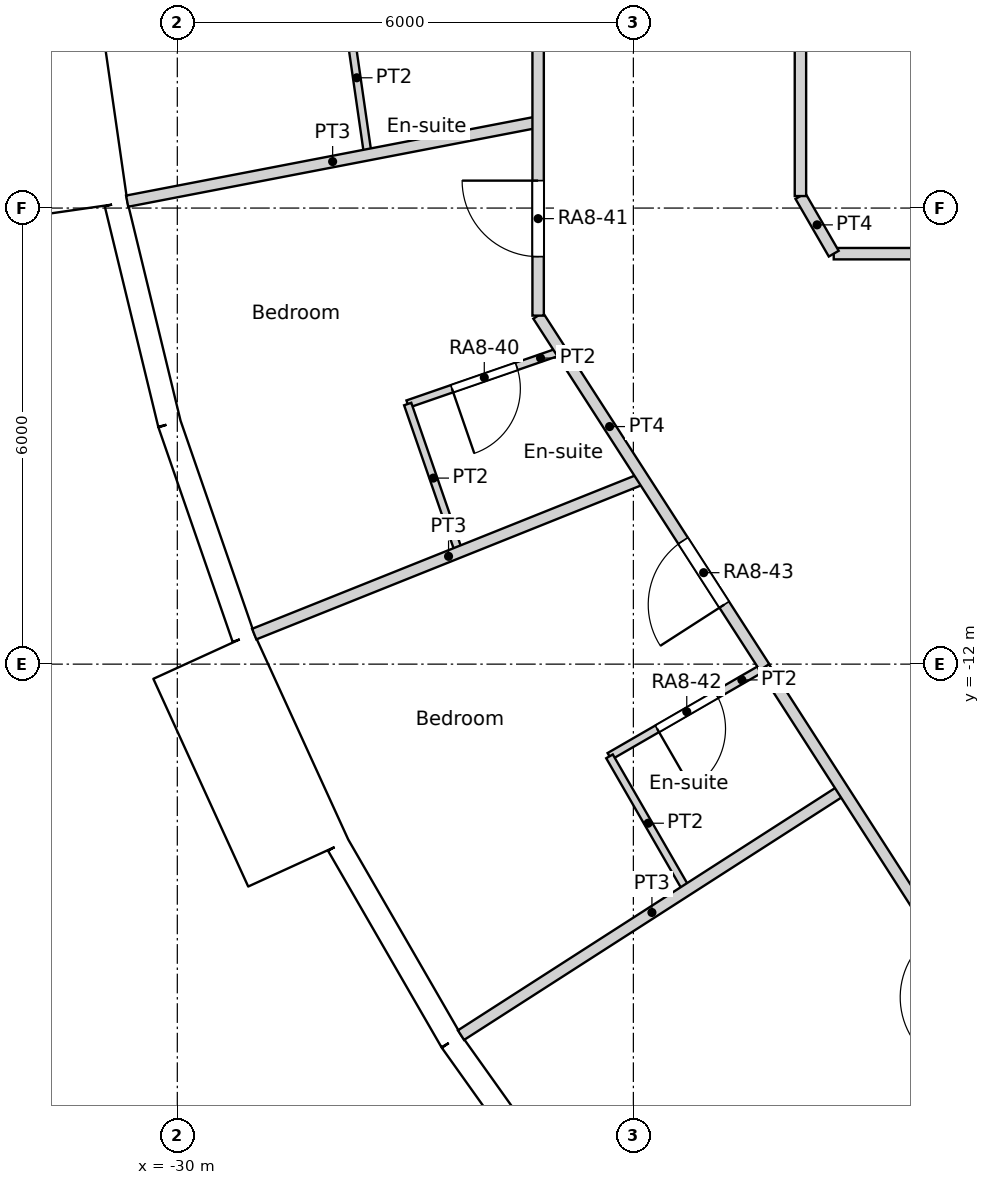
"""IFC4 building model, lengths in metres.
Left out: names, types, materials, properties, quantities, classifications, styles, units other than length and angle.
Written with IfcOpenShell. Run it as: python <this file> out.ifc"""

import sys

from ifc_helpers import new_model, si_unit, direction, frame, frame_2d, origin, origin_2d, place, context, subcontext, project, spatial, rectangle, circle, extrude, element, fill, save


model = new_model("IFC4")
c1 = context("Model", 3, precision=1e-05, world=origin(), true_north=direction((0.0, 1.0)))
c2 = subcontext(c1, "Body", "Model", "MODEL_VIEW")
j1 = project(units=[si_unit("LENGTHUNIT", "METRE"), si_unit("PLANEANGLEUNIT", "RADIAN")], contexts=[c1])
p1 = place(None, origin())
s1 = spatial("IfcSite", under=j1, at=p1, CompositionType="ELEMENT")
p2 = place(p1, origin())
s2 = spatial("IfcBuilding", under=s1, at=p2, CompositionType="ELEMENT")
p3 = place(p2, frame((0.0, 0.0, 103.8)))
s3 = spatial("IfcBuildingStorey", under=s2, at=p3, CompositionType="ELEMENT", Elevation=103.8)
for number, where, z_axis, x_axis in (
    (1, (-29.048, -8.529, 0.0), (0.0, 0.0, 1.0), (1.0, 0.0, 0.0)),
    (2, (-26.909, -13.873, 0.0), (0.0, 0.0, 1.0), (1.0, 0.0, 0.0)),
):
    element("IfcColumn", number, at=place(p3, frame(where, z_axis=z_axis, x_axis=x_axis)), inside=s3, PredefinedType="COLUMN", context=c2, shape_type="SweptSolid", body=[
        extrude(circle(Radius=0.6, at=origin_2d()), origin(), (0.0, 0.0, 1.0), 3.6),
    ])
for number, where, z_axis, x_axis in (
    (3, (-23.067, -8.396, 0.0), (0.0, 0.0, 1.0), (1.0, 0.0, 0.0)),
    (4, (-20.509, -13.489, 0.0), (0.0, 0.0, 1.0), (1.0, 0.0, 0.0)),
):
    element("IfcColumn", number, at=place(p3, frame(where, z_axis=z_axis, x_axis=x_axis)), inside=s3, PredefinedType="COLUMN", context=c2, shape_type="SweptSolid", body=[
        extrude(circle(Radius=0.65, at=origin_2d()), origin(), (0.0, 0.0, 1.0), 3.6),
    ])
p4 = place(p3, frame((-31.802, -3.057, -0.45), z_axis=(0.0, 0.0, 1.0), x_axis=(0.142332746704, -0.989818866872, 0.0)))
e5 = element("IfcWall", 5, at=p4, inside=s3, PredefinedType="ELEMENTEDWALL", context=c2, shape_type="SweptSolid", body=[
    extrude(rectangle(XDim=3.0, YDim=1.45, at=frame_2d((1.5, 0.0))), origin(), (0.0, 0.0, 1.0), 3.6),
])
p5 = place(p4, frame((1.5, 0.0, 2.0)))
e6 = element("IfcOpeningElement", 6, at=p5, cuts=e5, PredefinedType="OPENING", context=c2, shape_type="SweptSolid", body=[
    extrude(circle(Radius=0.9, at=origin_2d()), frame((0.0, 0.735, 0.0), z_axis=(0.0, -1.0, 0.0), x_axis=(1.0, 0.0, 0.0)), (0.0, 0.0, 1.0), 1.47),
])
p6 = place(p3, frame((-30.806, -5.944, 0.0), z_axis=(0.0, 0.0, 1.0), x_axis=(0.235743081534, -0.971815414319, 0.0)))
e7 = element("IfcWall", 7, at=p6, inside=s3, PredefinedType="SOLIDWALL", context=c2, shape_type="SweptSolid", body=[
    extrude(rectangle(XDim=2.979, YDim=0.3, at=frame_2d((1.49, 0.0))), origin(), (0.0, 0.0, 1.0), 3.15),
])
p7 = place(p6, frame((1.49, 0.0, 1.55)))
e8 = element("IfcOpeningElement", 8, at=p7, cuts=e7, PredefinedType="OPENING", context=c2, shape_type="SweptSolid", body=[
    extrude(circle(Radius=0.9, at=origin_2d()), frame((0.0, 0.16, 0.0), z_axis=(0.0, -1.0, 0.0), x_axis=(1.0, 0.0, 0.0)), (0.0, 0.0, 1.0), 0.32),
])
p8 = place(p3, frame((-30.104, -8.839, 0.0), z_axis=(0.0, 0.0, 1.0), x_axis=(0.327071167136, -0.944999709856, 0.0)))
e9 = element("IfcWall", 9, at=p8, inside=s3, PredefinedType="SOLIDWALL", context=c2, shape_type="SweptSolid", body=[
    extrude(rectangle(XDim=2.98, YDim=0.3, at=frame_2d((1.49, 0.0))), origin(), (0.0, 0.0, 1.0), 3.15),
])
p9 = place(p8, frame((1.49, 0.0, 1.55)))
e10 = element("IfcOpeningElement", 10, at=p9, cuts=e9, PredefinedType="OPENING", context=c2, shape_type="SweptSolid", body=[
    extrude(circle(Radius=0.9, at=origin_2d()), frame((0.0, 0.16, 0.0), z_axis=(0.0, -1.0, 0.0), x_axis=(1.0, 0.0, 0.0)), (0.0, 0.0, 1.0), 0.32),
])
p10 = place(p3, frame((-29.653, -11.893, -0.45), z_axis=(0.0, 0.0, 1.0), x_axis=(0.415427028395, -0.909626508012, 0.0)))
e11 = element("IfcWall", 11, at=p10, inside=s3, PredefinedType="ELEMENTEDWALL", context=c2, shape_type="SweptSolid", body=[
    extrude(rectangle(XDim=3.0, YDim=1.45, at=frame_2d((1.5, 0.0))), origin(), (0.0, 0.0, 1.0), 3.6),
])
p11 = place(p10, frame((1.5, 0.0, 2.0)))
e12 = element("IfcOpeningElement", 12, at=p11, cuts=e11, PredefinedType="OPENING", context=c2, shape_type="SweptSolid", body=[
    extrude(circle(Radius=0.9, at=origin_2d()), frame((0.0, 0.735, 0.0), z_axis=(0.0, -1.0, 0.0), x_axis=(1.0, 0.0, 0.0)), (0.0, 0.0, 1.0), 1.47),
])
p12 = place(p3, frame((-27.884, -14.382, 0.0), z_axis=(0.0, 0.0, 1.0), x_axis=(0.500025049464, -0.866010940986, 0.0)))
e13 = element("IfcWall", 13, at=p12, inside=s3, PredefinedType="SOLIDWALL", context=c2, shape_type="SweptSolid", body=[
    extrude(rectangle(XDim=2.98, YDim=0.3, at=frame_2d((1.49, 0.0))), origin(), (0.0, 0.0, 1.0), 3.15),
])
p13 = place(p12, frame((1.49, 0.0, 1.55)))
e14 = element("IfcOpeningElement", 14, at=p13, cuts=e13, PredefinedType="OPENING", context=c2, shape_type="SweptSolid", body=[
    extrude(circle(Radius=0.9, at=origin_2d()), frame((0.0, 0.16, 0.0), z_axis=(0.0, -1.0, 0.0), x_axis=(1.0, 0.0, 0.0)), (0.0, 0.0, 1.0), 0.32),
])
p14 = place(p3, frame((-26.394, -16.962, 0.0), z_axis=(0.0, 0.0, 1.0), x_axis=(0.580059407678, -0.81457417315, 0.0)))
e15 = element("IfcWall", 15, at=p14, inside=s3, PredefinedType="SOLIDWALL", context=c2, shape_type="SweptSolid", body=[
    extrude(rectangle(XDim=2.979, YDim=0.3, at=frame_2d((1.49, 0.0))), origin(), (0.0, 0.0, 1.0), 3.15),
])
p15 = place(p14, frame((1.49, 0.0, 1.55)))
e16 = element("IfcOpeningElement", 16, at=p15, cuts=e15, PredefinedType="OPENING", context=c2, shape_type="SweptSolid", body=[
    extrude(circle(Radius=0.9, at=origin_2d()), frame((0.0, 0.16, 0.0), z_axis=(0.0, -1.0, 0.0), x_axis=(1.0, 0.0, 0.0)), (0.0, 0.0, 1.0), 0.32),
])
p16 = place(p3, frame((-21.802, -5.842, 0.0), z_axis=(0.0, 0.0, 1.0), x_axis=(0.0, 1.0, 0.0)))
e17 = element("IfcWall", 17, at=p16, inside=s3, PredefinedType="PARTITIONING", context=c2, shape_type="SweptSolid", body=[
    extrude(rectangle(XDim=11.684, YDim=0.15, at=frame_2d((5.842, 0.0))), origin(), (0.0, 0.0, 1.0), 3.15),
])
p17 = place(p3, frame((-21.802, -5.842, 0.0), z_axis=(0.0, 0.0, 1.0), x_axis=(0.500277597875, -0.865865073245, 0.0)))
e18 = element("IfcWall", 18, at=p17, inside=s3, PredefinedType="PARTITIONING", context=c2, shape_type="SweptSolid", body=[
    extrude(rectangle(XDim=0.875, YDim=0.15, at=frame_2d((0.438, 0.0))), origin(), (0.0, 0.0, 1.0), 3.15),
])
p18 = place(p3, frame((-21.364, -6.6, 0.0), z_axis=(0.0, 0.0, 1.0), x_axis=(1.0, 0.0, 0.0)))
e19 = element("IfcWall", 19, at=p18, inside=s3, PredefinedType="PARTITIONING", context=c2, shape_type="SweptSolid", body=[
    extrude(rectangle(XDim=5.564, YDim=0.15, at=frame_2d((2.782, 0.0))), origin(), (0.0, 0.0, 1.0), 3.15),
])
p19 = place(p3, frame((-25.253, -7.415, 0.0), z_axis=(0.0, 0.0, 1.0), x_axis=(0.0, 1.0, 0.0)))
e20 = element("IfcWall", 20, at=p19, inside=s3, PredefinedType="PARTITIONING", context=c2, shape_type="SweptSolid", body=[
    extrude(rectangle(XDim=14.83, YDim=0.15, at=frame_2d((7.415, 0.0))), origin(), (0.0, 0.0, 1.0), 3.15),
])
p20 = place(p19, frame((11.17, 0.0, 0.0)))
e21 = element("IfcOpeningElement", 21, at=p20, cuts=e20, PredefinedType="OPENING", context=c2, shape_type="SweptSolid", body=[
    extrude(rectangle(XDim=1.1, YDim=2.1, at=frame_2d((0.55, 1.05))), frame((0.0, 0.075, 0.0), z_axis=(0.0, -1.0, 0.0), x_axis=(1.0, 0.0, 0.0)), (0.0, 0.0, 1.0), 0.15),
])
p21 = place(p19, frame((0.776, 0.0, 0.0)))
e22 = element("IfcOpeningElement", 22, at=p21, cuts=e20, PredefinedType="OPENING", context=c2, shape_type="SweptSolid", body=[
    extrude(rectangle(XDim=1.0, YDim=2.1, at=frame_2d((0.5, 1.05))), frame((0.0, 0.075, 0.0), z_axis=(0.0, -1.0, 0.0), x_axis=(1.0, 0.0, 0.0)), (0.0, 0.0, 1.0), 0.15),
])
p22 = place(p3, frame((-25.253, -7.415, 0.0), z_axis=(0.0, 0.0, 1.0), x_axis=(0.541385585623, -0.840774433293, 0.0)))
e23 = element("IfcWall", 23, at=p22, inside=s3, PredefinedType="PARTITIONING", context=c2, shape_type="SweptSolid", body=[
    extrude(rectangle(XDim=5.5, YDim=0.15, at=frame_2d((2.75, 0.0))), origin(), (0.0, 0.0, 1.0), 3.15),
])
p23 = place(p22, frame((3.522, 0.0, 0.0)))
e24 = element("IfcOpeningElement", 24, at=p23, cuts=e23, PredefinedType="OPENING", context=c2, shape_type="SweptSolid", body=[
    extrude(rectangle(XDim=1.0, YDim=2.1, at=frame_2d((0.5, 1.05))), frame((0.0, 0.075, 0.0), z_axis=(0.0, -1.0, 0.0), x_axis=(1.0, 0.0, 0.0)), (0.0, 0.0, 1.0), 0.15),
])
p24 = place(p3, frame((-22.283, -12.036, 0.0), z_axis=(0.0, 0.0, 1.0), x_axis=(0.540591053907, -0.841285511842, 0.0)))
e25 = element("IfcWall", 25, at=p24, inside=s3, PredefinedType="PARTITIONING", context=c2, shape_type="SweptSolid", body=[
    extrude(rectangle(XDim=9.336, YDim=0.15, at=frame_2d((4.668, 0.0))), origin(), (0.0, 0.0, 1.0), 3.15),
])
p25 = place(p24, frame((4.167, 0.0, 0.0)))
e26 = element("IfcOpeningElement", 26, at=p25, cuts=e25, PredefinedType="OPENING", context=c2, shape_type="SweptSolid", body=[
    extrude(rectangle(XDim=1.0, YDim=2.04, at=frame_2d((0.5, 1.02))), frame((0.0, 0.075, 0.0), z_axis=(0.0, -1.0, 0.0), x_axis=(1.0, 0.0, 0.0)), (0.0, 0.0, 1.0), 0.15),
])
p26 = place(p3, frame((-27.785, -3.273, 0.0), z_axis=(0.0, 0.0, 1.0), x_axis=(0.142640130423, -0.989774617372, 0.0)))
e27 = element("IfcWall", 27, at=p26, inside=s3, PredefinedType="PARTITIONING", context=c2, shape_type="SweptSolid", body=[
    extrude(rectangle(XDim=2.047, YDim=0.1, at=frame_2d((1.023, 0.0))), origin(), (0.0, 0.0, 1.0), 3.15),
])
p27 = place(p3, frame((-30.66, -5.909, 0.0), z_axis=(0.0, 0.0, 1.0), x_axis=(0.981949161207, 0.189145036425, 0.0)))
e28 = element("IfcWall", 28, at=p27, inside=s3, PredefinedType="PARTITIONING", context=c2, shape_type="SweptSolid", body=[
    extrude(rectangle(XDim=5.506, YDim=0.15, at=frame_2d((2.753, 0.0))), origin(), (0.0, 0.0, 1.0), 3.15),
])
p28 = place(p3, frame((-26.969, -8.578, 0.0), z_axis=(0.0, 0.0, 1.0), x_axis=(0.945146525342, 0.326646667877, 0.0)))
e29 = element("IfcWall", 29, at=p28, inside=s3, PredefinedType="PARTITIONING", context=c2, shape_type="SweptSolid", body=[
    extrude(rectangle(XDim=2.133, YDim=0.1, at=frame_2d((1.066, 0.0))), origin(), (0.0, 0.0, 1.0), 3.15),
])
p29 = place(p28, frame((0.616, 0.0, 0.0)))
e30 = element("IfcOpeningElement", 30, at=p29, cuts=e29, PredefinedType="OPENING", context=c2, shape_type="SweptSolid", body=[
    extrude(rectangle(XDim=0.9, YDim=2.04, at=frame_2d((0.45, 1.02))), frame((0.0, 0.05, 0.0), z_axis=(0.0, -1.0, 0.0), x_axis=(1.0, 0.0, 0.0)), (0.0, 0.0, 1.0), 0.1),
])
p30 = place(p3, frame((-26.969, -8.578, 0.0), z_axis=(0.0, 0.0, 1.0), x_axis=(0.326825955114, -0.945084543871, 0.0)))
e31 = element("IfcWall", 31, at=p30, inside=s3, PredefinedType="PARTITIONING", context=c2, shape_type="SweptSolid", body=[
    extrude(rectangle(XDim=2.062, YDim=0.1, at=frame_2d((1.031, 0.0))), origin(), (0.0, 0.0, 1.0), 3.15),
])
p31 = place(p3, frame((-28.988, -11.605, 0.0), z_axis=(0.0, 0.0, 1.0), x_axis=(0.928372711727, 0.371650518795, 0.0)))
e32 = element("IfcWall", 32, at=p31, inside=s3, PredefinedType="PARTITIONING", context=c2, shape_type="SweptSolid", body=[
    extrude(rectangle(XDim=5.508, YDim=0.15, at=frame_2d((2.754, 0.0))), origin(), (0.0, 0.0, 1.0), 3.15),
])
p32 = place(p3, frame((-24.314, -13.213, 0.0), z_axis=(0.0, 0.0, 1.0), x_axis=(0.866007195875, 0.500031535699, 0.0)))
e33 = element("IfcWall", 33, at=p32, inside=s3, PredefinedType="PARTITIONING", context=c2, shape_type="SweptSolid", body=[
    extrude(rectangle(XDim=2.347, YDim=0.1, at=frame_2d((1.174, 0.0))), origin(), (0.0, 0.0, 1.0), 3.15),
])
p33 = place(p32, frame((0.724, 0.0, 0.0)))
e34 = element("IfcOpeningElement", 34, at=p33, cuts=e33, PredefinedType="OPENING", context=c2, shape_type="SweptSolid", body=[
    extrude(rectangle(XDim=0.9, YDim=2.04, at=frame_2d((0.45, 1.02))), frame((0.0, 0.05, 0.0), z_axis=(0.0, -1.0, 0.0), x_axis=(1.0, 0.0, 0.0)), (0.0, 0.0, 1.0), 0.1),
])
p34 = place(p3, frame((-24.314, -13.213, 0.0), z_axis=(0.0, 0.0, 1.0), x_axis=(0.499899251727, -0.866083563014, 0.0)))
e35 = element("IfcWall", 35, at=p34, inside=s3, PredefinedType="PARTITIONING", context=c2, shape_type="SweptSolid", body=[
    extrude(rectangle(XDim=2.032, YDim=0.1, at=frame_2d((1.016, 0.0))), origin(), (0.0, 0.0, 1.0), 3.15),
])
p35 = place(p3, frame((-26.268, -16.881, 0.0), z_axis=(0.0, 0.0, 1.0), x_axis=(0.841333855553, 0.540515812443, 0.0)))
e36 = element("IfcWall", 36, at=p35, inside=s3, PredefinedType="PARTITIONING", context=c2, shape_type="SweptSolid", body=[
    extrude(rectangle(XDim=5.972, YDim=0.15, at=frame_2d((2.986, 0.0))), origin(), (0.0, 0.0, 1.0), 3.15),
])
p36 = place(p5, origin())
e37 = element("IfcWindow", 37, at=p36, inside=s3, PartitioningType="SINGLE_PANEL", PredefinedType="WINDOW", context=c2, shape_type="SweptSolid", body=[
    extrude(circle(Radius=0.9, at=origin_2d()), frame((0.0, 0.695, 0.0), z_axis=(0.0, -1.0, 0.0), x_axis=(1.0, 0.0, 0.0)), (0.0, 0.0, 1.0), 0.1),
])
fill(e6, e37)
p37 = place(p7, origin())
e38 = element("IfcWindow", 38, at=p37, inside=s3, PartitioningType="SINGLE_PANEL", PredefinedType="WINDOW", context=c2, shape_type="SweptSolid", body=[
    extrude(circle(Radius=0.9, at=origin_2d()), frame((0.0, 0.12, 0.0), z_axis=(0.0, -1.0, 0.0), x_axis=(1.0, 0.0, 0.0)), (0.0, 0.0, 1.0), 0.1),
])
fill(e8, e38)
p38 = place(p9, origin())
e39 = element("IfcWindow", 39, at=p38, inside=s3, PartitioningType="SINGLE_PANEL", PredefinedType="WINDOW", context=c2, shape_type="SweptSolid", body=[
    extrude(circle(Radius=0.9, at=origin_2d()), frame((0.0, 0.12, 0.0), z_axis=(0.0, -1.0, 0.0), x_axis=(1.0, 0.0, 0.0)), (0.0, 0.0, 1.0), 0.1),
])
fill(e10, e39)
p39 = place(p11, origin())
e40 = element("IfcWindow", 40, at=p39, inside=s3, PartitioningType="SINGLE_PANEL", PredefinedType="WINDOW", context=c2, shape_type="SweptSolid", body=[
    extrude(circle(Radius=0.9, at=origin_2d()), frame((0.0, 0.695, 0.0), z_axis=(0.0, -1.0, 0.0), x_axis=(1.0, 0.0, 0.0)), (0.0, 0.0, 1.0), 0.1),
])
fill(e12, e40)
p40 = place(p13, origin())
e41 = element("IfcWindow", 41, at=p40, inside=s3, PartitioningType="SINGLE_PANEL", PredefinedType="WINDOW", context=c2, shape_type="SweptSolid", body=[
    extrude(circle(Radius=0.9, at=origin_2d()), frame((0.0, 0.12, 0.0), z_axis=(0.0, -1.0, 0.0), x_axis=(1.0, 0.0, 0.0)), (0.0, 0.0, 1.0), 0.1),
])
fill(e14, e41)
p41 = place(p15, origin())
e42 = element("IfcWindow", 42, at=p41, inside=s3, PartitioningType="SINGLE_PANEL", PredefinedType="WINDOW", context=c2, shape_type="SweptSolid", body=[
    extrude(circle(Radius=0.9, at=origin_2d()), frame((0.0, 0.12, 0.0), z_axis=(0.0, -1.0, 0.0), x_axis=(1.0, 0.0, 0.0)), (0.0, 0.0, 1.0), 0.1),
])
fill(e16, e42)
p42 = place(p29, origin())
e43 = element("IfcDoor", 43, at=p42, inside=s3, OperationType="SINGLE_SWING_RIGHT", PredefinedType="DOOR", context=c2, shape_type="SweptSolid", body=[
    extrude(rectangle(XDim=0.9, YDim=2.04, at=frame_2d((0.45, 1.02))), frame((0.0, 0.025, 0.0), z_axis=(0.0, -1.0, 0.0), x_axis=(1.0, 0.0, 0.0)), (0.0, 0.0, 1.0), 0.05),
])
fill(e30, e43)
p43 = place(p21, origin())
e44 = element("IfcDoor", 44, at=p43, inside=s3, OperationType="SINGLE_SWING_RIGHT", PredefinedType="DOOR", context=c2, shape_type="SweptSolid", body=[
    extrude(rectangle(XDim=1.0, YDim=2.1, at=frame_2d((0.5, 1.05))), frame((0.0, 0.025, 0.0), z_axis=(0.0, -1.0, 0.0), x_axis=(1.0, 0.0, 0.0)), (0.0, 0.0, 1.0), 0.05),
])
fill(e22, e44)
p44 = place(p33, origin())
e45 = element("IfcDoor", 45, at=p44, inside=s3, OperationType="SINGLE_SWING_RIGHT", PredefinedType="DOOR", context=c2, shape_type="SweptSolid", body=[
    extrude(rectangle(XDim=0.9, YDim=2.04, at=frame_2d((0.45, 1.02))), frame((0.0, 0.025, 0.0), z_axis=(0.0, -1.0, 0.0), x_axis=(1.0, 0.0, 0.0)), (0.0, 0.0, 1.0), 0.05),
])
fill(e34, e45)
p45 = place(p23, origin())
e46 = element("IfcDoor", 46, at=p45, inside=s3, OperationType="SINGLE_SWING_LEFT", PredefinedType="DOOR", context=c2, shape_type="SweptSolid", body=[
    extrude(rectangle(XDim=1.0, YDim=2.1, at=frame_2d((0.5, 1.05))), frame((0.0, 0.025, 0.0), z_axis=(0.0, -1.0, 0.0), x_axis=(1.0, 0.0, 0.0)), (0.0, 0.0, 1.0), 0.05),
])
fill(e24, e46)
save(model, sys.argv[1])
